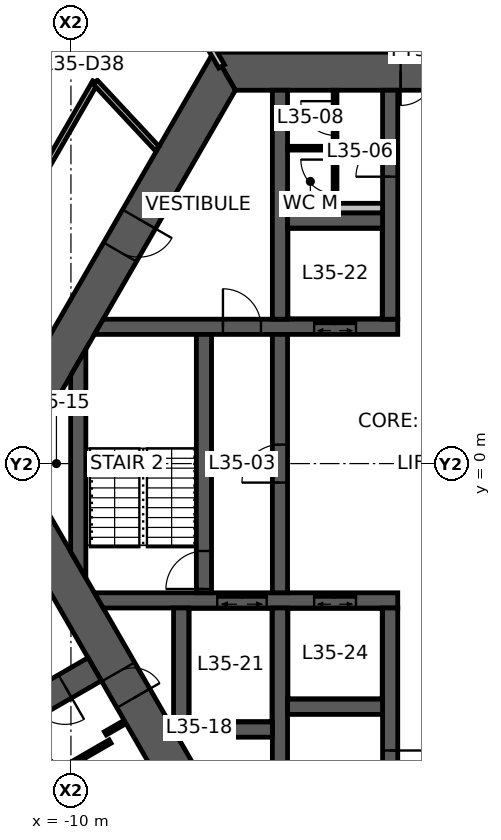
"""IFC4 building model, lengths in metres.
Left out: names, types, materials, properties, quantities, classifications, styles, units other than length and angle.
Written with IfcOpenShell. Run it as: python <this file> out.ifc"""

import sys

from ifc_helpers import new_model, si_unit, direction, frame, frame_2d, origin, place, context, subcontext, project, spatial, polyline, rectangle, outline, extrude, element, fill, save


model = new_model("IFC4")
c1 = context("Model", 3, precision=1e-05, world=origin(), true_north=direction((0.0, 1.0)))
c2 = subcontext(c1, "Body", "Model", "MODEL_VIEW")
j1 = project(units=[si_unit("LENGTHUNIT", "METRE"), si_unit("PLANEANGLEUNIT", "RADIAN")], contexts=[c1])
p1 = place(None, origin())
s1 = spatial("IfcSite", under=j1, at=p1, CompositionType="ELEMENT")
p2 = place(p1, origin())
s2 = spatial("IfcBuilding", under=s1, at=p2, CompositionType="ELEMENT")
p3 = place(p2, frame((0.0, 0.0, 140.9)))
s3 = spatial("IfcBuildingStorey", under=s2, at=p3, CompositionType="ELEMENT", Elevation=140.9)
p4 = place(p3, frame((5.961, 10.325, 0.0), z_axis=(0.0, 0.0, 1.0), x_axis=(-1.0, 0.0, 0.0)))
e1 = element("IfcWall", 1, at=p4, inside=s3, PredefinedType="SHEAR", context=c2, shape_type="SweptSolid", body=[
    extrude(outline(polyline([(-0.289, -0.5), (4.636, -0.5), (5.536, -0.5), (6.386, -0.5), (7.286, -0.5), (12.211, -0.5), (11.634, 0.5), (7.286, 0.5), (6.386, 0.5), (5.536, 0.5), (4.636, 0.5), (0.289, 0.5), (-0.289, -0.5)])), origin(), (0.0, 0.0, 1.0), 3.9),
])
p5 = place(p4, frame((6.386, 0.0, 0.0)))
e2 = element("IfcOpeningElement", 2, at=p5, cuts=e1, PredefinedType="OPENING", context=c2, shape_type="SweptSolid", body=[
    extrude(rectangle(XDim=0.9, YDim=2.1, at=frame_2d((0.45, 1.05))), frame((0.0, 0.51, 0.0), z_axis=(0.0, -1.0, 0.0), x_axis=(1.0, 0.0, 0.0)), (0.0, 0.0, 1.0), 1.02),
])
p6 = place(p4, frame((4.636, 0.0, 0.0)))
e3 = element("IfcOpeningElement", 3, at=p6, cuts=e1, PredefinedType="OPENING", context=c2, shape_type="SweptSolid", body=[
    extrude(rectangle(XDim=0.9, YDim=2.1, at=frame_2d((0.45, 1.05))), frame((0.0, 0.51, 0.0), z_axis=(0.0, -1.0, 0.0), x_axis=(1.0, 0.0, 0.0)), (0.0, 0.0, 1.0), 1.02),
])
p7 = place(p3, frame((-5.961, 10.325, 0.0), z_axis=(0.0, 0.0, 1.0), x_axis=(-0.500004296715, -0.866022923061, 0.0)))
e4 = element("IfcWall", 4, at=p7, inside=s3, PredefinedType="SHEAR", context=c2, shape_type="SweptSolid", body=[
    extrude(outline(polyline([(-0.289, -0.5), (4.494, -0.5), (5.494, -0.5), (12.211, -0.5), (11.634, 0.5), (5.494, 0.5), (4.494, 0.5), (0.289, 0.5), (-0.289, -0.5)])), origin(), (0.0, 0.0, 1.0), 3.9),
])
p8 = place(p7, frame((4.494, 0.0, 0.0)))
e5 = element("IfcOpeningElement", 5, at=p8, cuts=e4, PredefinedType="OPENING", context=c2, shape_type="SweptSolid", body=[
    extrude(rectangle(XDim=1.0, YDim=2.1, at=frame_2d((0.5, 1.05))), frame((0.0, 0.51, 0.0), z_axis=(0.0, -1.0, 0.0), x_axis=(1.0, 0.0, 0.0)), (0.0, 0.0, 1.0), 1.02),
])
p9 = place(p3, frame((-11.922, 0.0, 0.0), z_axis=(0.0, 0.0, 1.0), x_axis=(0.500004296715, -0.866022923061, 0.0)))
e6 = element("IfcWall", 6, at=p9, inside=s3, PredefinedType="SHEAR", context=c2, shape_type="SweptSolid", body=[
    extrude(outline(polyline([(-0.289, -0.5), (6.331, -0.5), (7.131, -0.5), (12.211, -0.5), (11.634, 0.5), (7.131, 0.5), (6.331, 0.5), (0.289, 0.5), (-0.289, -0.5)])), origin(), (0.0, 0.0, 1.0), 3.9),
])
p10 = place(p9, frame((6.331, 0.0, 0.0)))
e7 = element("IfcOpeningElement", 7, at=p10, cuts=e6, PredefinedType="OPENING", context=c2, shape_type="SweptSolid", body=[
    extrude(rectangle(XDim=0.8, YDim=2.1, at=frame_2d((0.4, 1.05))), frame((0.0, 0.51, 0.0), z_axis=(0.0, -1.0, 0.0), x_axis=(1.0, 0.0, 0.0)), (0.0, 0.0, 1.0), 1.02),
])
p11 = place(p3, frame((-9.375, -5.413, 0.0), z_axis=(0.0, 0.0, 1.0), x_axis=(-0.866032377459, -0.499987921047, 0.0)))
e8 = element("IfcWall", 8, at=p11, inside=s3, PredefinedType="SHEAR", context=c2, shape_type="SweptSolid", body=[
    extrude(rectangle(XDim=7.696, YDim=0.7, at=frame_2d((3.848, 0.0))), origin(), (0.0, 0.0, 1.0), 3.9),
])
p12 = place(p11, frame((0.9, 0.0, 0.0)))
e9 = element("IfcOpeningElement", 9, at=p12, cuts=e8, PredefinedType="OPENING", context=c2, shape_type="SweptSolid", body=[
    extrude(rectangle(XDim=1.0, YDim=2.1, at=frame_2d((0.5, 1.05))), frame((0.0, 0.36, 0.0), z_axis=(0.0, -1.0, 0.0), x_axis=(1.0, 0.0, 0.0)), (0.0, 0.0, 1.0), 0.72),
])
p13 = place(p3, frame((-9.266, 3.6, 0.0), z_axis=(0.0, 0.0, 1.0), x_axis=(1.0, 0.0, 0.0)))
e10 = element("IfcWall", 10, at=p13, inside=s3, PredefinedType="SHEAR", context=c2, shape_type="SweptSolid", body=[
    extrude(outline(polyline([(-0.115, -0.2), (3.266, -0.2), (4.266, -0.2), (5.667, -0.2), (6.767, -0.2), (7.866, -0.2), (7.866, 0.2), (6.767, 0.2), (5.667, 0.2), (4.266, 0.2), (3.266, 0.2), (0.115, 0.2), (-0.115, -0.2)])), origin(), (0.0, 0.0, 1.0), 3.9),
])
p14 = place(p13, frame((3.266, 0.0, 0.0)))
e11 = element("IfcOpeningElement", 11, at=p14, cuts=e10, PredefinedType="OPENING", context=c2, shape_type="SweptSolid", body=[
    extrude(rectangle(XDim=1.0, YDim=2.1, at=frame_2d((0.5, 1.05))), frame((0.0, 0.21, 0.0), z_axis=(0.0, -1.0, 0.0), x_axis=(1.0, 0.0, 0.0)), (0.0, 0.0, 1.0), 0.42),
])
p15 = place(p13, frame((5.667, 0.0, 0.0)))
e12 = element("IfcOpeningElement", 12, at=p15, cuts=e10, PredefinedType="OPENING", context=c2, shape_type="SweptSolid", body=[
    extrude(rectangle(XDim=1.1, YDim=2.1, at=frame_2d((0.55, 1.05))), frame((0.0, 0.21, 0.0), z_axis=(0.0, -1.0, 0.0), x_axis=(1.0, 0.0, 0.0)), (0.0, 0.0, 1.0), 0.42),
])
p16 = place(p3, frame((-9.266, -3.6, 0.0), z_axis=(0.0, 0.0, 1.0), x_axis=(1.0, 0.0, 0.0)))
e13 = element("IfcWall", 13, at=p16, inside=s3, PredefinedType="SHEAR", context=c2, shape_type="SweptSolid", body=[
    extrude(outline(polyline([(0.115, -0.2), (3.116, -0.2), (4.417, -0.2), (5.667, -0.2), (6.767, -0.2), (7.866, -0.2), (7.866, 0.2), (6.767, 0.2), (5.667, 0.2), (4.417, 0.2), (3.116, 0.2), (-0.115, 0.2), (0.115, -0.2)])), origin(), (0.0, 0.0, 1.0), 3.9),
])
p17 = place(p16, frame((5.667, 0.0, 0.0)))
e14 = element("IfcOpeningElement", 14, at=p17, cuts=e13, PredefinedType="OPENING", context=c2, shape_type="SweptSolid", body=[
    extrude(rectangle(XDim=1.1, YDim=2.1, at=frame_2d((0.55, 1.05))), frame((0.0, 0.21, 0.0), z_axis=(0.0, -1.0, 0.0), x_axis=(1.0, 0.0, 0.0)), (0.0, 0.0, 1.0), 0.42),
])
p18 = place(p16, frame((3.116, 0.0, 0.0)))
e15 = element("IfcOpeningElement", 15, at=p18, cuts=e13, PredefinedType="OPENING", context=c2, shape_type="SweptSolid", body=[
    extrude(rectangle(XDim=1.3, YDim=2.1, at=frame_2d((0.65, 1.05))), frame((0.0, 0.21, 0.0), z_axis=(0.0, -1.0, 0.0), x_axis=(1.0, 0.0, 0.0)), (0.0, 0.0, 1.0), 0.42),
])
p19 = place(p3, frame((-1.6, 3.8, 0.0), z_axis=(0.0, 0.0, 1.0), x_axis=(0.0, 1.0, 0.0)))
e16 = element("IfcWall", 16, at=p19, inside=s3, PredefinedType="SHEAR", context=c2, shape_type="SweptSolid", body=[
    extrude(rectangle(XDim=6.025, YDim=0.4, at=frame_2d((3.012, 0.0))), origin(), (0.0, 0.0, 1.0), 3.9),
])
p20 = place(p19, frame((3.75, 0.0, 0.0)))
e17 = element("IfcOpeningElement", 17, at=p20, cuts=e16, PredefinedType="OPENING", context=c2, shape_type="SweptSolid", body=[
    extrude(rectangle(XDim=0.9, YDim=2.1, at=frame_2d((0.45, 1.05))), frame((0.0, 0.21, 0.0), z_axis=(0.0, -1.0, 0.0), x_axis=(1.0, 0.0, 0.0)), (0.0, 0.0, 1.0), 0.42),
])
p21 = place(p3, frame((-1.6, -3.8, 0.0), z_axis=(0.0, 0.0, 1.0), x_axis=(0.0, -1.0, 0.0)))
e18 = element("IfcWall", 18, at=p21, inside=s3, PredefinedType="SHEAR", context=c2, shape_type="SweptSolid", body=[
    extrude(rectangle(XDim=6.025, YDim=0.4, at=frame_2d((3.012, 0.0))), origin(), (0.0, 0.0, 1.0), 3.9),
])
p22 = place(p21, frame((3.75, 0.0, 0.0)))
e19 = element("IfcOpeningElement", 19, at=p22, cuts=e18, PredefinedType="OPENING", context=c2, shape_type="SweptSolid", body=[
    extrude(rectangle(XDim=0.9, YDim=2.1, at=frame_2d((0.45, 1.05))), frame((0.0, 0.21, 0.0), z_axis=(0.0, -1.0, 0.0), x_axis=(1.0, 0.0, 0.0)), (0.0, 0.0, 1.0), 0.42),
])
p23 = place(p3, frame((-4.5, -3.4, 0.0), z_axis=(0.0, 0.0, 1.0), x_axis=(0.0, 1.0, 0.0)))
e20 = element("IfcWall", 20, at=p23, inside=s3, PredefinedType="SHEAR", context=c2, shape_type="SweptSolid", body=[
    extrude(rectangle(XDim=6.8, YDim=0.4, at=frame_2d((3.4, 0.0))), origin(), (0.0, 0.0, 1.0), 3.9),
])
p24 = place(p23, frame((2.9, 0.0, 0.0)))
e21 = element("IfcOpeningElement", 21, at=p24, cuts=e20, PredefinedType="OPENING", context=c2, shape_type="SweptSolid", body=[
    extrude(rectangle(XDim=1.0, YDim=2.1, at=frame_2d((0.5, 1.05))), frame((0.0, 0.21, 0.0), z_axis=(0.0, -1.0, 0.0), x_axis=(1.0, 0.0, 0.0)), (0.0, 0.0, 1.0), 0.42),
])
p25 = place(p3, frame((-6.5, -3.4, 0.0), z_axis=(0.0, 0.0, 1.0), x_axis=(0.0, 1.0, 0.0)))
e22 = element("IfcWall", 22, at=p25, inside=s3, PredefinedType="SHEAR", context=c2, shape_type="SweptSolid", body=[
    extrude(rectangle(XDim=6.8, YDim=0.4, at=frame_2d((3.4, 0.0))), origin(), (0.0, 0.0, 1.0), 3.9),
])
p26 = place(p25, frame((0.1, 0.0, 0.0)))
e23 = element("IfcOpeningElement", 23, at=p26, cuts=e22, PredefinedType="OPENING", context=c2, shape_type="SweptSolid", body=[
    extrude(rectangle(XDim=1.0, YDim=2.1, at=frame_2d((0.5, 1.05))), frame((0.0, 0.21, 0.0), z_axis=(0.0, -1.0, 0.0), x_axis=(1.0, 0.0, 0.0)), (0.0, 0.0, 1.0), 0.42),
])
for number, where, z_axis, x_axis in (
    (24, (-4.5, 3.8, 0.0), (0.0, 0.0, 1.0), (0.0, 1.0, 0.0)),
    (25, (-4.5, -3.8, 0.0), (0.0, 0.0, 1.0), (0.0, -1.0, 0.0)),
):
    element("IfcWall", number, at=place(p3, frame(where, z_axis=z_axis, x_axis=x_axis)), inside=s3, PredefinedType="SHEAR", context=c2, shape_type="SweptSolid", body=[
        extrude(rectangle(XDim=6.025, YDim=0.4, at=frame_2d((3.012, 0.0))), origin(), (0.0, 0.0, 1.0), 3.9),
    ])
for number, where, z_axis, x_axis in (
    (26, (-4.3, 6.4, 0.0), (0.0, 0.0, 1.0), (1.0, 0.0, 0.0)),
    (27, (-4.3, -6.4, 0.0), (0.0, 0.0, 1.0), (1.0, 0.0, 0.0)),
):
    element("IfcWall", number, at=place(p3, frame(where, z_axis=z_axis, x_axis=x_axis)), inside=s3, PredefinedType="SHEAR", context=c2, shape_type="SweptSolid", body=[
        extrude(rectangle(XDim=2.5, YDim=0.4, at=frame_2d((1.25, 0.0))), origin(), (0.0, 0.0, 1.0), 3.9),
    ])
p27 = place(p3, frame((-6.9, -7.0, 0.0), z_axis=(0.0, 0.0, 1.0), x_axis=(1.0, 0.0, 0.0)))
e28 = element("IfcWall", 28, at=p27, inside=s3, PredefinedType="SHEAR", context=c2, shape_type="SweptSolid", body=[
    extrude(rectangle(XDim=2.2, YDim=0.4, at=frame_2d((1.1, 0.0))), origin(), (0.0, 0.0, 1.0), 3.9),
])
p28 = place(p3, frame((-7.1, -3.8, 0.0), z_axis=(0.0, 0.0, 1.0), x_axis=(0.0, -1.0, 0.0)))
e29 = element("IfcWall", 29, at=p28, inside=s3, PredefinedType="SHEAR", context=c2, shape_type="SweptSolid", body=[
    extrude(outline(polyline([(0.0, -0.2), (3.206, -0.2), (3.4, 0.0), (3.4, 0.2), (0.0, 0.2), (0.0, -0.2)])), origin(), (0.0, 0.0, 1.0), 3.9),
])
p29 = place(p3, frame((-9.808, -2.662, 0.0), z_axis=(0.0, 0.0, 1.0), x_axis=(0.0, 1.0, 0.0)))
e30 = element("IfcWall", 30, at=p29, inside=s3, PredefinedType="SHEAR", context=c2, shape_type="SweptSolid", body=[
    extrude(outline(polyline([(-0.346, -0.2), (5.671, -0.2), (4.978, 0.2), (0.346, 0.2), (-0.346, -0.2)])), origin(), (0.0, 0.0, 1.0), 3.9),
])
p30 = place(p3, frame((-4.3, 6.725, 0.0), z_axis=(0.0, 0.0, 1.0), x_axis=(1.0, 0.0, 0.0)))
e31 = element("IfcWall", 31, at=p30, inside=s3, PredefinedType="PLUMBINGWALL", context=c2, shape_type="SweptSolid", body=[
    extrude(rectangle(XDim=2.5, YDim=0.25, at=frame_2d((1.25, 0.0))), origin(), (0.0, 0.0, 1.0), 3.9),
])
p31 = place(p3, frame((-3.05, 6.6, 0.0), z_axis=(0.0, 0.0, 1.0), x_axis=(0.0, 1.0, 0.0)))
e32 = element("IfcWall", 32, at=p31, inside=s3, PredefinedType="PARTITIONING", context=c2, shape_type="SweptSolid", body=[
    extrude(rectangle(XDim=3.225, YDim=0.1, at=frame_2d((1.612, 0.0))), origin(), (0.0, 0.0, 1.0), 2.95),
])
p32 = place(p31, frame((0.5, 0.0, 0.0)))
e33 = element("IfcOpeningElement", 33, at=p32, cuts=e32, PredefinedType="OPENING", context=c2, shape_type="SweptSolid", body=[
    extrude(rectangle(XDim=0.9, YDim=2.1, at=frame_2d((0.45, 1.05))), frame((0.0, 0.06, 0.0), z_axis=(0.0, -1.0, 0.0), x_axis=(1.0, 0.0, 0.0)), (0.0, 0.0, 1.0), 0.12),
])
p33 = place(p31, frame((2.038, 0.0, 0.0)))
e34 = element("IfcOpeningElement", 34, at=p33, cuts=e32, PredefinedType="OPENING", context=c2, shape_type="SweptSolid", body=[
    extrude(rectangle(XDim=0.9, YDim=2.1, at=frame_2d((0.45, 1.05))), frame((0.0, 0.06, 0.0), z_axis=(0.0, -1.0, 0.0), x_axis=(1.0, 0.0, 0.0)), (0.0, 0.0, 1.0), 0.12),
])
p34 = place(p3, frame((-3.1, 8.3, 0.0), z_axis=(0.0, 0.0, 1.0), x_axis=(-1.0, 0.0, 0.0)))
e35 = element("IfcWall", 35, at=p34, inside=s3, PredefinedType="PARTITIONING", context=c2, shape_type="SweptSolid", body=[
    extrude(rectangle(XDim=1.2, YDim=0.1, at=frame_2d((0.6, 0.0))), origin(), (0.0, 0.0, 1.0), 2.95),
])
p35 = place(p3, frame((-6.035, 10.453, 0.0), z_axis=(0.0, 0.0, 1.0), x_axis=(-0.499989830942, 0.866031274813, 0.0)))
e36 = element("IfcWall", 36, at=p35, inside=s3, PredefinedType="PARTITIONING", context=c2, shape_type="SweptSolid", body=[
    extrude(rectangle(XDim=7.93, YDim=0.175, at=frame_2d((3.965, 0.0))), origin(), (0.0, 0.0, 1.0), 3.05),
])
p36 = place(p35, frame((1.13, 0.0, 0.0)))
e37 = element("IfcOpeningElement", 37, at=p36, cuts=e36, PredefinedType="OPENING", context=c2, shape_type="SweptSolid", body=[
    extrude(rectangle(XDim=1.0, YDim=2.1, at=frame_2d((0.5, 1.05))), frame((0.0, 0.098, 0.0), z_axis=(0.0, -1.0, 0.0), x_axis=(1.0, 0.0, 0.0)), (0.0, 0.0, 1.0), 0.195),
])
p37 = place(p3, frame((-12.908, 3.893, 0.0), z_axis=(0.0, 0.0, 1.0), x_axis=(0.500006411147, 0.866021702275, 0.0)))
e38 = element("IfcWall", 38, at=p37, inside=s3, PredefinedType="PARTITIONING", context=c2, shape_type="SweptSolid", body=[
    extrude(rectangle(XDim=7.095, YDim=0.15, at=frame_2d((3.548, 0.0))), origin(), (0.0, 0.0, 1.0), 2.95),
])
p38 = place(p37, frame((3.047, 0.0, 0.0)))
e39 = element("IfcOpeningElement", 39, at=p38, cuts=e38, PredefinedType="OPENING", context=c2, shape_type="SweptSolid", body=[
    extrude(rectangle(XDim=1.0, YDim=2.1, at=frame_2d((0.5, 1.05))), frame((0.0, 0.085, 0.0), z_axis=(0.0, -1.0, 0.0), x_axis=(1.0, 0.0, 0.0)), (0.0, 0.0, 1.0), 0.17),
])
p39 = place(p3, frame((-9.36, 10.038, 0.0), z_axis=(0.0, 0.0, 1.0), x_axis=(0.681997114248, -0.731354863358, 0.0)))
e40 = element("IfcWall", 40, at=p39, inside=s3, PredefinedType="PARTITIONING", context=c2, shape_type="SweptSolid", body=[
    extrude(outline(polyline([(0.0, -0.075), (2.384, -0.075), (2.384, 0.0), (2.382, 0.075), (0.0, 0.075), (0.0, -0.075)])), origin(), (0.0, 0.0, 1.0), 2.95),
])
p40 = place(p3, frame((-9.291, 13.349, 0.0), z_axis=(0.0, 0.0, 1.0), x_axis=(-0.500033344505, -0.86600615147, 0.0)))
e41 = element("IfcWall", 41, at=p40, inside=s3, PredefinedType="PARTITIONING", context=c2, shape_type="SweptSolid", body=[
    extrude(rectangle(XDim=3.331, YDim=0.1, at=frame_2d((1.666, 0.0))), origin(), (0.0, 0.0, 1.0), 2.95),
])
p41 = place(p40, frame((0.3, 0.0, 0.0)))
e42 = element("IfcOpeningElement", 42, at=p41, cuts=e41, PredefinedType="OPENING", context=c2, shape_type="SweptSolid", body=[
    extrude(rectangle(XDim=0.9, YDim=2.1, at=frame_2d((0.45, 1.05))), frame((0.0, 0.06, 0.0), z_axis=(0.0, -1.0, 0.0), x_axis=(1.0, 0.0, 0.0)), (0.0, 0.0, 1.0), 0.12),
])
p42 = place(p3, frame((-10.355, -8.115, 0.0), z_axis=(0.0, 0.0, 1.0), x_axis=(0.866094119867, 0.499880961361, 0.0)))
e43 = element("IfcWall", 43, at=p42, inside=s3, PredefinedType="PARTITIONING", context=c2, shape_type="SweptSolid", body=[
    extrude(rectangle(XDim=1.6, YDim=0.1, at=frame_2d((0.8, 0.0))), origin(), (0.0, 0.0, 1.0), 2.95),
])
p43 = place(p3, frame((-9.094, -7.098, 0.0), z_axis=(0.0, 0.0, 1.0), x_axis=(0.865954211699, 0.50012328804, 0.0)))
e44 = element("IfcWall", 44, at=p43, inside=s3, PredefinedType="PARTITIONING", context=c2, shape_type="SweptSolid", body=[
    extrude(rectangle(XDim=0.58, YDim=0.1, at=frame_2d((0.29, 0.0))), origin(), (0.0, 0.0, 1.0), 2.95),
])
p44 = place(p5, origin())
e45 = element("IfcDoor", 45, at=p44, inside=s3, OperationType="SINGLE_SWING_RIGHT", PredefinedType="DOOR", context=c2, shape_type="SweptSolid", body=[
    extrude(rectangle(XDim=0.9, YDim=2.1, at=frame_2d((0.45, 1.05))), frame((0.0, 0.025, 0.0), z_axis=(0.0, -1.0, 0.0), x_axis=(1.0, 0.0, 0.0)), (0.0, 0.0, 1.0), 0.05),
])
fill(e2, e45)
p45 = place(p10, origin())
e46 = element("IfcDoor", 46, at=p45, inside=s3, OperationType="SINGLE_SWING_RIGHT", PredefinedType="DOOR", context=c2, shape_type="SweptSolid", body=[
    extrude(rectangle(XDim=0.8, YDim=2.1, at=frame_2d((0.4, 1.05))), frame((0.0, 0.025, 0.0), z_axis=(0.0, -1.0, 0.0), x_axis=(1.0, 0.0, 0.0)), (0.0, 0.0, 1.0), 0.05),
])
fill(e7, e46)
p46 = place(p8, origin())
e47 = element("IfcDoor", 47, at=p46, inside=s3, OperationType="SINGLE_SWING_LEFT", PredefinedType="DOOR", context=c2, shape_type="SweptSolid", body=[
    extrude(rectangle(XDim=1.0, YDim=2.1, at=frame_2d((0.5, 1.05))), frame((0.0, 0.025, 0.0), z_axis=(0.0, -1.0, 0.0), x_axis=(1.0, 0.0, 0.0)), (0.0, 0.0, 1.0), 0.05),
])
fill(e5, e47)
p47 = place(p24, origin())
e48 = element("IfcDoor", 48, at=p47, inside=s3, OperationType="SINGLE_SWING_LEFT", PredefinedType="DOOR", context=c2, shape_type="SweptSolid", body=[
    extrude(rectangle(XDim=1.0, YDim=2.1, at=frame_2d((0.5, 1.05))), frame((0.0, 0.025, 0.0), z_axis=(0.0, -1.0, 0.0), x_axis=(1.0, 0.0, 0.0)), (0.0, 0.0, 1.0), 0.05),
])
fill(e21, e48)
p48 = place(p26, origin())
e49 = element("IfcDoor", 49, at=p48, inside=s3, OperationType="SINGLE_SWING_LEFT", PredefinedType="DOOR", context=c2, shape_type="SweptSolid", body=[
    extrude(rectangle(XDim=1.0, YDim=2.1, at=frame_2d((0.5, 1.05))), frame((0.0, 0.025, 0.0), z_axis=(0.0, -1.0, 0.0), x_axis=(1.0, 0.0, 0.0)), (0.0, 0.0, 1.0), 0.05),
])
fill(e23, e49)
p49 = place(p14, origin())
e50 = element("IfcDoor", 50, at=p49, inside=s3, OperationType="SINGLE_SWING_LEFT", PredefinedType="DOOR", context=c2, shape_type="SweptSolid", body=[
    extrude(rectangle(XDim=1.0, YDim=2.1, at=frame_2d((0.5, 1.05))), frame((0.0, 0.025, 0.0), z_axis=(0.0, -1.0, 0.0), x_axis=(1.0, 0.0, 0.0)), (0.0, 0.0, 1.0), 0.05),
])
fill(e11, e50)
p50 = place(p20, origin())
e51 = element("IfcDoor", 51, at=p50, inside=s3, OperationType="SINGLE_SWING_LEFT", PredefinedType="DOOR", context=c2, shape_type="SweptSolid", body=[
    extrude(rectangle(XDim=0.9, YDim=2.1, at=frame_2d((0.45, 1.05))), frame((0.0, 0.025, 0.0), z_axis=(0.0, -1.0, 0.0), x_axis=(1.0, 0.0, 0.0)), (0.0, 0.0, 1.0), 0.05),
])
fill(e17, e51)
p51 = place(p22, origin())
e52 = element("IfcDoor", 52, at=p51, inside=s3, OperationType="SINGLE_SWING_LEFT", PredefinedType="DOOR", context=c2, shape_type="SweptSolid", body=[
    extrude(rectangle(XDim=0.9, YDim=2.1, at=frame_2d((0.45, 1.05))), frame((0.0, 0.025, 0.0), z_axis=(0.0, -1.0, 0.0), x_axis=(1.0, 0.0, 0.0)), (0.0, 0.0, 1.0), 0.05),
])
fill(e19, e52)
p52 = place(p12, origin())
e53 = element("IfcDoor", 53, at=p52, inside=s3, OperationType="SINGLE_SWING_LEFT", PredefinedType="DOOR", context=c2, shape_type="SweptSolid", body=[
    extrude(rectangle(XDim=1.0, YDim=2.1, at=frame_2d((0.5, 1.05))), frame((0.0, 0.025, 0.0), z_axis=(0.0, -1.0, 0.0), x_axis=(1.0, 0.0, 0.0)), (0.0, 0.0, 1.0), 0.05),
])
fill(e9, e53)
p53 = place(p32, origin())
e54 = element("IfcDoor", 54, at=p53, inside=s3, OperationType="SINGLE_SWING_RIGHT", PredefinedType="DOOR", context=c2, shape_type="SweptSolid", body=[
    extrude(rectangle(XDim=0.9, YDim=2.1, at=frame_2d((0.45, 1.05))), frame((0.0, 0.025, 0.0), z_axis=(0.0, -1.0, 0.0), x_axis=(1.0, 0.0, 0.0)), (0.0, 0.0, 1.0), 0.05),
])
fill(e33, e54)
p54 = place(p33, origin())
e55 = element("IfcDoor", 55, at=p54, inside=s3, OperationType="SINGLE_SWING_RIGHT", PredefinedType="DOOR", context=c2, shape_type="SweptSolid", body=[
    extrude(rectangle(XDim=0.9, YDim=2.1, at=frame_2d((0.45, 1.05))), frame((0.0, 0.025, 0.0), z_axis=(0.0, -1.0, 0.0), x_axis=(1.0, 0.0, 0.0)), (0.0, 0.0, 1.0), 0.05),
])
fill(e34, e55)
p55 = place(p15, origin())
e56 = element("IfcDoor", 56, at=p55, inside=s3, OperationType="DOUBLE_DOOR_SLIDING", PredefinedType="DOOR", context=c2, shape_type="SweptSolid", body=[
    extrude(rectangle(XDim=1.1, YDim=2.1, at=frame_2d((0.55, 1.05))), frame((0.0, 0.025, 0.0), z_axis=(0.0, -1.0, 0.0), x_axis=(1.0, 0.0, 0.0)), (0.0, 0.0, 1.0), 0.05),
])
fill(e12, e56)
p56 = place(p17, origin())
e57 = element("IfcDoor", 57, at=p56, inside=s3, OperationType="DOUBLE_DOOR_SLIDING", PredefinedType="DOOR", context=c2, shape_type="SweptSolid", body=[
    extrude(rectangle(XDim=1.1, YDim=2.1, at=frame_2d((0.55, 1.05))), frame((0.0, 0.025, 0.0), z_axis=(0.0, -1.0, 0.0), x_axis=(1.0, 0.0, 0.0)), (0.0, 0.0, 1.0), 0.05),
])
fill(e14, e57)
p57 = place(p18, origin())
e58 = element("IfcDoor", 58, at=p57, inside=s3, OperationType="DOUBLE_DOOR_SLIDING", PredefinedType="DOOR", context=c2, shape_type="SweptSolid", body=[
    extrude(rectangle(XDim=1.3, YDim=2.1, at=frame_2d((0.65, 1.05))), frame((0.0, 0.025, 0.0), z_axis=(0.0, -1.0, 0.0), x_axis=(1.0, 0.0, 0.0)), (0.0, 0.0, 1.0), 0.05),
])
fill(e15, e58)
save(model, sys.argv[1])
